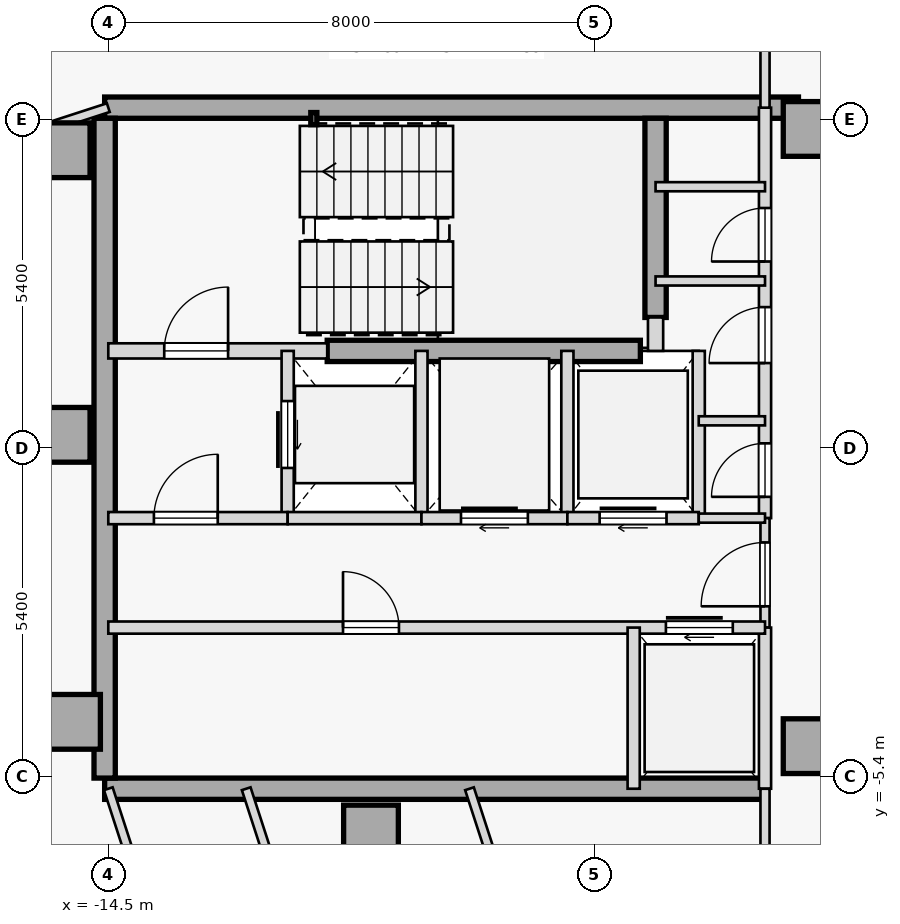
"""IFC4 building model, lengths in metres.
Left out: names, types, materials, properties, quantities, classifications, styles, units other than length and angle.
Written with IfcOpenShell. Run it as: python <this file> out.ifc"""

import sys

from ifc_helpers import new_model, si_unit, direction, frame, frame_2d, origin, origin_2d, place, context, subcontext, project, spatial, rectangle, hollow_rectangle, extrude, element, fill, save


model = new_model("IFC4")
c1 = context("Model", 3, precision=1e-05, world=origin(), true_north=direction((0.0, 1.0)))
c2 = subcontext(c1, "Body", "Model", "MODEL_VIEW")
j1 = project(units=[si_unit("LENGTHUNIT", "METRE"), si_unit("PLANEANGLEUNIT", "RADIAN")], contexts=[c1])
p1 = place(None, origin())
s1 = spatial("IfcSite", under=j1, at=p1, CompositionType="ELEMENT")
p2 = place(p1, origin())
s2 = spatial("IfcBuilding", under=s1, at=p2, CompositionType="ELEMENT")
p3 = place(p2, frame((0.0, 0.0, 237.7)))
s3 = spatial("IfcBuildingStorey", under=s2, at=p3, CompositionType="ELEMENT", Elevation=237.7)
for number, where, z_axis, x_axis in (
    (1, (-15.25, 4.9, 0.0), (0.0, 0.0, 1.0), (1.0, 0.0, 0.0)),
    (2, (-15.25, 0.22, 0.0), (0.0, 0.0, 1.0), (1.0, 0.0, 0.0)),
    (3, (-15.08, -4.5, 0.0), (0.0, 0.0, 1.0), (1.0, 0.0, 0.0)),
    (4, (-10.18, -6.32, 0.0), (0.0, 0.0, 1.0), (1.0, 0.0, 0.0)),
    (5, (-2.95, -4.9, 0.0), (0.0, 0.0, 1.0), (1.0, 0.0, 0.0)),
    (6, (-2.95, 5.25, 0.0), (0.0, 0.0, 1.0), (1.0, 0.0, 0.0)),
):
    element("IfcColumn", number, at=place(p3, frame(where, z_axis=z_axis, x_axis=x_axis)), inside=s3, PredefinedType="COLUMN", context=c2, shape_type="SweptSolid", body=[
        extrude(rectangle(XDim=0.9, YDim=0.9, at=origin_2d()), origin(), (0.0, 0.0, 1.0), 3.35),
    ])
p4 = place(p3, frame((-14.56, 5.6, 0.0), z_axis=(0.0, 0.0, 1.0), x_axis=(1.0, 0.0, 0.0)))
e7 = element("IfcWall", 7, at=p4, inside=s3, PredefinedType="SHEAR", context=c2, shape_type="SweptSolid", body=[
    extrude(rectangle(XDim=11.41, YDim=0.35, at=frame_2d((5.705, 0.0))), origin(), (0.0, 0.0, 1.0), 3.125),
])
p5 = place(p3, frame((-14.56, -5.6, 0.0), z_axis=(0.0, 0.0, 1.0), x_axis=(1.0, 0.0, 0.0)))
e8 = element("IfcWall", 8, at=p5, inside=s3, PredefinedType="SHEAR", context=c2, shape_type="SweptSolid", body=[
    extrude(rectangle(XDim=10.86, YDim=0.35, at=frame_2d((5.43, 0.0))), origin(), (0.0, 0.0, 1.0), 3.125),
])
p6 = place(p3, frame((-14.56, -5.425, 0.0), z_axis=(0.0, 0.0, 1.0), x_axis=(0.0, 1.0, 0.0)))
e9 = element("IfcWall", 9, at=p6, inside=s3, PredefinedType="SHEAR", context=c2, shape_type="SweptSolid", body=[
    extrude(rectangle(XDim=10.85, YDim=0.35, at=frame_2d((5.425, 0.0))), origin(), (0.0, 0.0, 1.0), 3.125),
])
p7 = place(p3, frame((-5.5, 2.15, 0.0), z_axis=(0.0, 0.0, 1.0), x_axis=(0.0, 1.0, 0.0)))
e10 = element("IfcWall", 10, at=p7, inside=s3, PredefinedType="SHEAR", context=c2, shape_type="SweptSolid", body=[
    extrude(rectangle(XDim=3.275, YDim=0.35, at=frame_2d((1.638, 0.0))), origin(), (0.0, 0.0, 1.0), 3.125),
])
p8 = place(p3, frame((-10.9, 1.6, 0.0), z_axis=(0.0, 0.0, 1.0), x_axis=(1.0, 0.0, 0.0)))
e11 = element("IfcWall", 11, at=p8, inside=s3, PredefinedType="SHEAR", context=c2, shape_type="SweptSolid", body=[
    extrude(rectangle(XDim=5.15, YDim=0.35, at=frame_2d((2.575, 0.0))), origin(), (0.0, 0.0, 1.0), 3.125),
])
p9 = place(p3, frame((-11.12, 5.42, 0.0), z_axis=(0.0, 0.0, 1.0), x_axis=(1.0, 0.0, 0.0)))
e12 = element("IfcColumn", 12, at=p9, inside=s3, PredefinedType="COLUMN", context=c2, shape_type="SweptSolid", body=[
    extrude(hollow_rectangle(XDim=0.1, YDim=0.2, WallThickness=0.008, at=origin_2d()), origin(), (0.0, 0.0, 1.0), 3.35),
])
p10 = place(p3, frame((-14.5, 1.6, 0.0), z_axis=(0.0, 0.0, 1.0), x_axis=(1.0, 0.0, 0.0)))
e13 = element("IfcWall", 13, at=p10, inside=s3, PredefinedType="STANDARD", context=c2, shape_type="SweptSolid", body=[
    extrude(rectangle(XDim=3.6, YDim=0.25, at=frame_2d((1.8, 0.0))), origin(), (0.0, 0.0, 1.0), 3.125),
])
p11 = place(p10, frame((0.92, 0.0, 0.0)))
e14 = element("IfcOpeningElement", 14, at=p11, cuts=e13, PredefinedType="OPENING", context=c2, shape_type="SweptSolid", body=[
    extrude(rectangle(XDim=1.05, YDim=2.15, at=frame_2d((0.525, 1.075))), frame((0.0, 0.135, 0.0), z_axis=(0.0, -1.0, 0.0), x_axis=(1.0, 0.0, 0.0)), (0.0, 0.0, 1.0), 0.27),
])
p12 = place(p3, frame((-5.5, 1.6, 0.0), z_axis=(0.0, 0.0, 1.0), x_axis=(0.0, 1.0, 0.0)))
e15 = element("IfcWall", 15, at=p12, inside=s3, PredefinedType="STANDARD", context=c2, shape_type="SweptSolid", body=[
    extrude(rectangle(XDim=0.55, YDim=0.25, at=frame_2d((0.275, 0.0))), origin(), (0.0, 0.0, 1.0), 3.125),
])
p13 = place(p3, frame((-3.7, -1.15, 0.0), z_axis=(0.0, 0.0, 1.0), x_axis=(0.0, 1.0, 0.0)))
e16 = element("IfcWall", 16, at=p13, inside=s3, PredefinedType="STANDARD", context=c2, shape_type="SweptSolid", body=[
    extrude(rectangle(XDim=6.75, YDim=0.2, at=frame_2d((3.375, 0.0))), origin(), (0.0, 0.0, 1.0), 3.125),
])
p14 = place(p13, frame((0.35, 0.0, 0.0)))
e17 = element("IfcOpeningElement", 17, at=p14, cuts=e16, PredefinedType="OPENING", context=c2, shape_type="SweptSolid", body=[
    extrude(rectangle(XDim=0.88, YDim=2.15, at=frame_2d((0.44, 1.075))), frame((0.0, 0.11, 0.0), z_axis=(0.0, -1.0, 0.0), x_axis=(1.0, 0.0, 0.0)), (0.0, 0.0, 1.0), 0.22),
])
p15 = place(p13, frame((2.55, 0.0, 0.0)))
e18 = element("IfcOpeningElement", 18, at=p15, cuts=e16, PredefinedType="OPENING", context=c2, shape_type="SweptSolid", body=[
    extrude(rectangle(XDim=0.92, YDim=2.15, at=frame_2d((0.46, 1.075))), frame((0.0, 0.11, 0.0), z_axis=(0.0, -1.0, 0.0), x_axis=(1.0, 0.0, 0.0)), (0.0, 0.0, 1.0), 0.22),
])
p16 = place(p13, frame((4.22, 0.0, 0.0)))
e19 = element("IfcOpeningElement", 19, at=p16, cuts=e16, PredefinedType="OPENING", context=c2, shape_type="SweptSolid", body=[
    extrude(rectangle(XDim=0.88, YDim=2.15, at=frame_2d((0.44, 1.075))), frame((0.0, 0.11, 0.0), z_axis=(0.0, -1.0, 0.0), x_axis=(1.0, 0.0, 0.0)), (0.0, 0.0, 1.0), 0.22),
])
p17 = place(p3, frame((-3.7, -2.95, 0.0), z_axis=(0.0, 0.0, 1.0), x_axis=(0.0, 1.0, 0.0)))
e20 = element("IfcWall", 20, at=p17, inside=s3, PredefinedType="PARTITIONING", context=c2, shape_type="SweptSolid", body=[
    extrude(rectangle(XDim=1.8, YDim=0.15, at=frame_2d((0.9, 0.0))), origin(), (0.0, 0.0, 1.0), 3.125),
])
p18 = place(p17, frame((0.35, 0.0, 0.0)))
e21 = element("IfcOpeningElement", 21, at=p18, cuts=e20, PredefinedType="OPENING", context=c2, shape_type="SweptSolid", body=[
    extrude(rectangle(XDim=1.05, YDim=2.18, at=frame_2d((0.525, 1.09))), frame((0.0, 0.085, 0.0), z_axis=(0.0, -1.0, 0.0), x_axis=(1.0, 0.0, 0.0)), (0.0, 0.0, 1.0), 0.17),
])
p19 = place(p3, frame((-3.7, -5.6, 0.0), z_axis=(0.0, 0.0, 1.0), x_axis=(0.0, 1.0, 0.0)))
e22 = element("IfcWall", 22, at=p19, inside=s3, PredefinedType="STANDARD", context=c2, shape_type="SweptSolid", body=[
    extrude(rectangle(XDim=2.65, YDim=0.2, at=frame_2d((1.325, 0.0))), origin(), (0.0, 0.0, 1.0), 3.125),
])
p20 = place(p3, frame((-11.55, -1.15, 0.0), z_axis=(0.0, 0.0, 1.0), x_axis=(0.0, 1.0, 0.0)))
e23 = element("IfcWall", 23, at=p20, inside=s3, PredefinedType="STANDARD", context=c2, shape_type="SweptSolid", body=[
    extrude(rectangle(XDim=2.75, YDim=0.2, at=frame_2d((1.375, 0.0))), origin(), (0.0, 0.0, 1.0), 3.125),
])
p21 = place(p20, frame((0.825, 0.0, 0.0)))
e24 = element("IfcOpeningElement", 24, at=p21, cuts=e23, PredefinedType="OPENING", context=c2, shape_type="SweptSolid", body=[
    extrude(rectangle(XDim=1.1, YDim=2.15, at=frame_2d((0.55, 1.075))), frame((0.0, 0.11, 0.0), z_axis=(0.0, -1.0, 0.0), x_axis=(1.0, 0.0, 0.0)), (0.0, 0.0, 1.0), 0.22),
])
p22 = place(p3, frame((-9.35, -1.15, 0.0), z_axis=(0.0, 0.0, 1.0), x_axis=(0.0, 1.0, 0.0)))
e25 = element("IfcWall", 25, at=p22, inside=s3, PredefinedType="STANDARD", context=c2, shape_type="SweptSolid", body=[
    extrude(rectangle(XDim=2.75, YDim=0.2, at=frame_2d((1.375, 0.0))), origin(), (0.0, 0.0, 1.0), 3.125),
])
p23 = place(p3, frame((-14.5, -1.15, 0.0), z_axis=(0.0, 0.0, 1.0), x_axis=(1.0, 0.0, 0.0)))
e26 = element("IfcWall", 26, at=p23, inside=s3, PredefinedType="STANDARD", context=c2, shape_type="SweptSolid", body=[
    extrude(rectangle(XDim=2.95, YDim=0.2, at=frame_2d((1.475, 0.0))), origin(), (0.0, 0.0, 1.0), 3.125),
])
p24 = place(p23, frame((0.75, 0.0, 0.0)))
e27 = element("IfcOpeningElement", 27, at=p24, cuts=e26, PredefinedType="OPENING", context=c2, shape_type="SweptSolid", body=[
    extrude(rectangle(XDim=1.05, YDim=2.18, at=frame_2d((0.525, 1.09))), frame((0.0, 0.11, 0.0), z_axis=(0.0, -1.0, 0.0), x_axis=(1.0, 0.0, 0.0)), (0.0, 0.0, 1.0), 0.22),
])
p25 = place(p3, frame((-11.55, -1.15, 0.0), z_axis=(0.0, 0.0, 1.0), x_axis=(1.0, 0.0, 0.0)))
e28 = element("IfcWall", 28, at=p25, inside=s3, PredefinedType="STANDARD", context=c2, shape_type="SweptSolid", body=[
    extrude(rectangle(XDim=2.2, YDim=0.2, at=frame_2d((1.1, 0.0))), origin(), (0.0, 0.0, 1.0), 3.125),
])
p26 = place(p3, frame((-6.95, -1.15, 0.0), z_axis=(0.0, 0.0, 1.0), x_axis=(0.0, 1.0, 0.0)))
e29 = element("IfcWall", 29, at=p26, inside=s3, PredefinedType="STANDARD", context=c2, shape_type="SweptSolid", body=[
    extrude(rectangle(XDim=2.75, YDim=0.2, at=frame_2d((1.375, 0.0))), origin(), (0.0, 0.0, 1.0), 3.125),
])
p27 = place(p3, frame((-9.35, -1.15, 0.0), z_axis=(0.0, 0.0, 1.0), x_axis=(1.0, 0.0, 0.0)))
e30 = element("IfcWall", 30, at=p27, inside=s3, PredefinedType="STANDARD", context=c2, shape_type="SweptSolid", body=[
    extrude(rectangle(XDim=2.4, YDim=0.2, at=frame_2d((1.2, 0.0))), origin(), (0.0, 0.0, 1.0), 3.125),
])
p28 = place(p27, frame((0.65, 0.0, 0.0)))
e31 = element("IfcOpeningElement", 31, at=p28, cuts=e30, PredefinedType="OPENING", context=c2, shape_type="SweptSolid", body=[
    extrude(rectangle(XDim=1.1, YDim=2.15, at=frame_2d((0.55, 1.075))), frame((0.0, 0.11, 0.0), z_axis=(0.0, -1.0, 0.0), x_axis=(1.0, 0.0, 0.0)), (0.0, 0.0, 1.0), 0.22),
])
p29 = place(p3, frame((-4.79, -1.15, 0.0), z_axis=(0.0, 0.0, 1.0), x_axis=(0.0, 1.0, 0.0)))
e32 = element("IfcWall", 32, at=p29, inside=s3, PredefinedType="STANDARD", context=c2, shape_type="SweptSolid", body=[
    extrude(rectangle(XDim=2.75, YDim=0.2, at=frame_2d((1.375, 0.0))), origin(), (0.0, 0.0, 1.0), 3.125),
])
p30 = place(p3, frame((-6.95, -1.15, 0.0), z_axis=(0.0, 0.0, 1.0), x_axis=(1.0, 0.0, 0.0)))
e33 = element("IfcWall", 33, at=p30, inside=s3, PredefinedType="STANDARD", context=c2, shape_type="SweptSolid", body=[
    extrude(rectangle(XDim=2.16, YDim=0.2, at=frame_2d((1.08, 0.0))), origin(), (0.0, 0.0, 1.0), 3.125),
])
p31 = place(p30, frame((0.53, 0.0, 0.0)))
e34 = element("IfcOpeningElement", 34, at=p31, cuts=e33, PredefinedType="OPENING", context=c2, shape_type="SweptSolid", body=[
    extrude(rectangle(XDim=1.1, YDim=2.15, at=frame_2d((0.55, 1.075))), frame((0.0, 0.11, 0.0), z_axis=(0.0, -1.0, 0.0), x_axis=(1.0, 0.0, 0.0)), (0.0, 0.0, 1.0), 0.22),
])
p32 = place(p3, frame((-4.79, -1.15, 0.0), z_axis=(0.0, 0.0, 1.0), x_axis=(1.0, 0.0, 0.0)))
e35 = element("IfcWall", 35, at=p32, inside=s3, PredefinedType="PARTITIONING", context=c2, shape_type="SweptSolid", body=[
    extrude(rectangle(XDim=1.09, YDim=0.15, at=frame_2d((0.545, 0.0))), origin(), (0.0, 0.0, 1.0), 3.125),
])
p33 = place(p3, frame((-14.5, -2.95, 0.0), z_axis=(0.0, 0.0, 1.0), x_axis=(1.0, 0.0, 0.0)))
e36 = element("IfcWall", 36, at=p33, inside=s3, PredefinedType="STANDARD", context=c2, shape_type="SweptSolid", body=[
    extrude(rectangle(XDim=10.8, YDim=0.2, at=frame_2d((5.4, 0.0))), origin(), (0.0, 0.0, 1.0), 3.125),
])
p34 = place(p33, frame((9.17, 0.0, 0.0)))
e37 = element("IfcOpeningElement", 37, at=p34, cuts=e36, PredefinedType="OPENING", context=c2, shape_type="SweptSolid", body=[
    extrude(rectangle(XDim=1.1, YDim=2.15, at=frame_2d((0.55, 1.075))), frame((0.0, 0.11, 0.0), z_axis=(0.0, -1.0, 0.0), x_axis=(1.0, 0.0, 0.0)), (0.0, 0.0, 1.0), 0.22),
])
p35 = place(p33, frame((3.86, 0.0, 0.0)))
e38 = element("IfcOpeningElement", 38, at=p35, cuts=e36, PredefinedType="OPENING", context=c2, shape_type="SweptSolid", body=[
    extrude(rectangle(XDim=0.92, YDim=2.15, at=frame_2d((0.46, 1.075))), frame((0.0, 0.11, 0.0), z_axis=(0.0, -1.0, 0.0), x_axis=(1.0, 0.0, 0.0)), (0.0, 0.0, 1.0), 0.22),
])
p36 = place(p3, frame((-5.86, -5.6, 0.0), z_axis=(0.0, 0.0, 1.0), x_axis=(0.0, 1.0, 0.0)))
e39 = element("IfcWall", 39, at=p36, inside=s3, PredefinedType="STANDARD", context=c2, shape_type="SweptSolid", body=[
    extrude(rectangle(XDim=2.65, YDim=0.2, at=frame_2d((1.325, 0.0))), origin(), (0.0, 0.0, 1.0), 3.125),
])
p37 = place(p3, frame((-5.5, 4.3, 0.0), z_axis=(0.0, 0.0, 1.0), x_axis=(1.0, 0.0, 0.0)))
e40 = element("IfcWall", 40, at=p37, inside=s3, PredefinedType="PARTITIONING", context=c2, shape_type="SweptSolid", body=[
    extrude(rectangle(XDim=1.8, YDim=0.15, at=frame_2d((0.9, 0.0))), origin(), (0.0, 0.0, 1.0), 3.125),
])
p38 = place(p3, frame((-4.79, 0.45, 0.0), z_axis=(0.0, 0.0, 1.0), x_axis=(1.0, 0.0, 0.0)))
e41 = element("IfcWall", 41, at=p38, inside=s3, PredefinedType="PARTITIONING", context=c2, shape_type="SweptSolid", body=[
    extrude(rectangle(XDim=1.09, YDim=0.15, at=frame_2d((0.545, 0.0))), origin(), (0.0, 0.0, 1.0), 3.125),
])
p39 = place(p3, frame((-5.5, 2.75, 0.0), z_axis=(0.0, 0.0, 1.0), x_axis=(1.0, 0.0, 0.0)))
e42 = element("IfcWall", 42, at=p39, inside=s3, PredefinedType="PARTITIONING", context=c2, shape_type="SweptSolid", body=[
    extrude(rectangle(XDim=1.8, YDim=0.15, at=frame_2d((0.9, 0.0))), origin(), (0.0, 0.0, 1.0), 3.125),
])
p40 = place(p3, frame((-16.865, 6.535, 0.0), z_axis=(0.0, 0.0, 1.0), x_axis=(0.951049118272, 0.309039762222, 0.0)))
e43 = element("IfcWall", 43, at=p40, inside=s3, PredefinedType="PARTITIONING", context=c2, shape_type="SweptSolid", body=[
    extrude(rectangle(XDim=4.53, YDim=0.15, at=frame_2d((2.265, 0.0))), origin(), (0.0, 0.0, 1.0), 3.125),
])
p41 = place(p3, frame((-3.7, -11.514, 0.0), z_axis=(0.0, 0.0, 1.0), x_axis=(-8.2572974e-05, 0.999999996591, 0.0)))
e44 = element("IfcWall", 44, at=p41, inside=s3, PredefinedType="PARTITIONING", context=c2, shape_type="SweptSolid", body=[
    extrude(rectangle(XDim=5.913, YDim=0.15, at=frame_2d((2.957, 0.0))), origin(), (0.0, 0.0, 1.0), 3.125),
])
p42 = place(p41, frame((2.497, 0.0, 0.0)))
e45 = element("IfcOpeningElement", 45, at=p42, cuts=e44, PredefinedType="OPENING", context=c2, shape_type="SweptSolid", body=[
    extrude(rectangle(XDim=0.92, YDim=2.15, at=frame_2d((0.46, 1.075))), frame((0.0, 0.085, 0.0), z_axis=(0.0, -1.0, 0.0), x_axis=(1.0, 0.0, 0.0)), (0.0, 0.0, 1.0), 0.17),
])
p43 = place(p3, frame((-17.792, 4.531, 0.0), z_axis=(0.0, 0.0, 1.0), x_axis=(0.951047546178, 0.309044600193, 0.0)))
e46 = element("IfcWall", 46, at=p43, inside=s3, PredefinedType="PARTITIONING", context=c2, shape_type="SweptSolid", body=[
    extrude(rectangle(XDim=3.461, YDim=0.15, at=frame_2d((1.73, 0.0))), origin(), (0.0, 0.0, 1.0), 3.125),
])
p44 = place(p43, frame((0.302, 0.0, 0.0)))
e47 = element("IfcOpeningElement", 47, at=p44, cuts=e46, PredefinedType="OPENING", context=c2, shape_type="SweptSolid", body=[
    extrude(rectangle(XDim=0.92, YDim=2.15, at=frame_2d((0.46, 1.075))), frame((0.0, 0.085, 0.0), z_axis=(0.0, -1.0, 0.0), x_axis=(1.0, 0.0, 0.0)), (0.0, 0.0, 1.0), 0.17),
])
p45 = place(p3, frame((-3.7, 5.6, 0.0), z_axis=(0.0, 0.0, 1.0), x_axis=(0.000139120755, 0.999999990323, 0.0)))
e48 = element("IfcWall", 48, at=p45, inside=s3, PredefinedType="PARTITIONING", context=c2, shape_type="SweptSolid", body=[
    extrude(rectangle(XDim=3.51, YDim=0.15, at=frame_2d((1.755, 0.0))), origin(), (0.0, 0.0, 1.0), 3.125),
])
p46 = place(p3, frame((-30.663, -9.757, 0.0), z_axis=(0.0, 0.0, 1.0), x_axis=(0.951058192995, 0.309011833974, 0.0)))
e49 = element("IfcWall", 49, at=p46, inside=s3, PredefinedType="PARTITIONING", context=c2, shape_type="SweptSolid", body=[
    extrude(rectangle(XDim=16.657, YDim=0.15, at=frame_2d((8.329, 0.0))), origin(), (0.0, 0.0, 1.0), 3.125),
])
p47 = place(p3, frame((-13.488, -8.713, 0.0), z_axis=(0.0, 0.0, 1.0), x_axis=(-0.309082700143, 0.951035164687, 0.0)))
e50 = element("IfcWall", 50, at=p47, inside=s3, PredefinedType="PARTITIONING", context=c2, shape_type="SweptSolid", body=[
    extrude(rectangle(XDim=3.274, YDim=0.15, at=frame_2d((1.637, 0.0))), origin(), (0.0, 0.0, 1.0), 3.125),
])
p48 = place(p3, frame((-9.679, -13.457, 0.0), z_axis=(0.0, 0.0, 1.0), x_axis=(-0.309010558951, 0.951058607267, 0.0)))
e51 = element("IfcWall", 51, at=p48, inside=s3, PredefinedType="PARTITIONING", context=c2, shape_type="SweptSolid", body=[
    extrude(rectangle(XDim=8.261, YDim=0.15, at=frame_2d((4.13, 0.0))), origin(), (0.0, 0.0, 1.0), 3.125),
])
p49 = place(p3, frame((-6.358, -12.377, 0.0), z_axis=(0.0, 0.0, 1.0), x_axis=(-0.309024097906, 0.951054208189, 0.0)))
e52 = element("IfcWall", 52, at=p49, inside=s3, PredefinedType="PARTITIONING", context=c2, shape_type="SweptSolid", body=[
    extrude(rectangle(XDim=7.126, YDim=0.15, at=frame_2d((3.563, 0.0))), origin(), (0.0, 0.0, 1.0), 2.675),
])
p50 = place(p11, origin())
e53 = element("IfcDoor", 53, at=p50, inside=s3, OperationType="SINGLE_SWING_RIGHT", PredefinedType="DOOR", context=c2, shape_type="SweptSolid", body=[
    extrude(rectangle(XDim=1.05, YDim=2.15, at=frame_2d((0.525, 1.075))), frame((0.0, 0.025, 0.0), z_axis=(0.0, -1.0, 0.0), x_axis=(1.0, 0.0, 0.0)), (0.0, 0.0, 1.0), 0.05),
])
fill(e14, e53)
p51 = place(p24, origin())
e54 = element("IfcDoor", 54, at=p51, inside=s3, OperationType="SINGLE_SWING_RIGHT", PredefinedType="DOOR", context=c2, shape_type="SweptSolid", body=[
    extrude(rectangle(XDim=1.05, YDim=2.18, at=frame_2d((0.525, 1.09))), frame((0.0, 0.025, 0.0), z_axis=(0.0, -1.0, 0.0), x_axis=(1.0, 0.0, 0.0)), (0.0, 0.0, 1.0), 0.05),
])
fill(e27, e54)
p52 = place(p18, origin())
e55 = element("IfcDoor", 55, at=p52, inside=s3, OperationType="SINGLE_SWING_LEFT", PredefinedType="DOOR", context=c2, shape_type="SweptSolid", body=[
    extrude(rectangle(XDim=1.05, YDim=2.18, at=frame_2d((0.525, 1.09))), frame((0.0, 0.025, 0.0), z_axis=(0.0, -1.0, 0.0), x_axis=(1.0, 0.0, 0.0)), (0.0, 0.0, 1.0), 0.05),
])
fill(e21, e55)
p53 = place(p21, origin())
e56 = element("IfcDoor", 56, at=p53, inside=s3, OperationType="SLIDING_TO_RIGHT", PredefinedType="DOOR", context=c2, shape_type="SweptSolid", body=[
    extrude(rectangle(XDim=1.1, YDim=2.15, at=frame_2d((0.55, 1.075))), frame((0.0, 0.025, 0.0), z_axis=(0.0, -1.0, 0.0), x_axis=(1.0, 0.0, 0.0)), (0.0, 0.0, 1.0), 0.05),
])
fill(e24, e56)
p54 = place(p28, origin())
e57 = element("IfcDoor", 57, at=p54, inside=s3, OperationType="SLIDING_TO_RIGHT", PredefinedType="DOOR", context=c2, shape_type="SweptSolid", body=[
    extrude(rectangle(XDim=1.1, YDim=2.15, at=frame_2d((0.55, 1.075))), frame((0.0, 0.025, 0.0), z_axis=(0.0, -1.0, 0.0), x_axis=(1.0, 0.0, 0.0)), (0.0, 0.0, 1.0), 0.05),
])
fill(e31, e57)
p55 = place(p31, origin())
e58 = element("IfcDoor", 58, at=p55, inside=s3, OperationType="SLIDING_TO_RIGHT", PredefinedType="DOOR", context=c2, shape_type="SweptSolid", body=[
    extrude(rectangle(XDim=1.1, YDim=2.15, at=frame_2d((0.55, 1.075))), frame((0.0, 0.025, 0.0), z_axis=(0.0, -1.0, 0.0), x_axis=(1.0, 0.0, 0.0)), (0.0, 0.0, 1.0), 0.05),
])
fill(e34, e58)
p56 = place(p34, origin())
e59 = element("IfcDoor", 59, at=p56, inside=s3, OperationType="SLIDING_TO_RIGHT", PredefinedType="DOOR", context=c2, shape_type="SweptSolid", body=[
    extrude(rectangle(XDim=1.1, YDim=2.15, at=frame_2d((0.55, 1.075))), frame((0.0, 0.025, 0.0), z_axis=(0.0, -1.0, 0.0), x_axis=(1.0, 0.0, 0.0)), (0.0, 0.0, 1.0), 0.05),
])
fill(e37, e59)
p57 = place(p35, origin())
e60 = element("IfcDoor", 60, at=p57, inside=s3, OperationType="SINGLE_SWING_LEFT", PredefinedType="DOOR", context=c2, shape_type="SweptSolid", body=[
    extrude(rectangle(XDim=0.92, YDim=2.15, at=frame_2d((0.46, 1.075))), frame((0.0, 0.025, 0.0), z_axis=(0.0, -1.0, 0.0), x_axis=(1.0, 0.0, 0.0)), (0.0, 0.0, 1.0), 0.05),
])
fill(e38, e60)
p58 = place(p14, origin())
e61 = element("IfcDoor", 61, at=p58, inside=s3, OperationType="SINGLE_SWING_LEFT", PredefinedType="DOOR", context=c2, shape_type="SweptSolid", body=[
    extrude(rectangle(XDim=0.88, YDim=2.15, at=frame_2d((0.44, 1.075))), frame((0.0, 0.025, 0.0), z_axis=(0.0, -1.0, 0.0), x_axis=(1.0, 0.0, 0.0)), (0.0, 0.0, 1.0), 0.05),
])
fill(e17, e61)
p59 = place(p15, origin())
e62 = element("IfcDoor", 62, at=p59, inside=s3, OperationType="SINGLE_SWING_LEFT", PredefinedType="DOOR", context=c2, shape_type="SweptSolid", body=[
    extrude(rectangle(XDim=0.92, YDim=2.15, at=frame_2d((0.46, 1.075))), frame((0.0, 0.025, 0.0), z_axis=(0.0, -1.0, 0.0), x_axis=(1.0, 0.0, 0.0)), (0.0, 0.0, 1.0), 0.05),
])
fill(e18, e62)
p60 = place(p16, origin())
e63 = element("IfcDoor", 63, at=p60, inside=s3, OperationType="SINGLE_SWING_LEFT", PredefinedType="DOOR", context=c2, shape_type="SweptSolid", body=[
    extrude(rectangle(XDim=0.88, YDim=2.15, at=frame_2d((0.44, 1.075))), frame((0.0, 0.025, 0.0), z_axis=(0.0, -1.0, 0.0), x_axis=(1.0, 0.0, 0.0)), (0.0, 0.0, 1.0), 0.05),
])
fill(e19, e63)
save(model, sys.argv[1])
